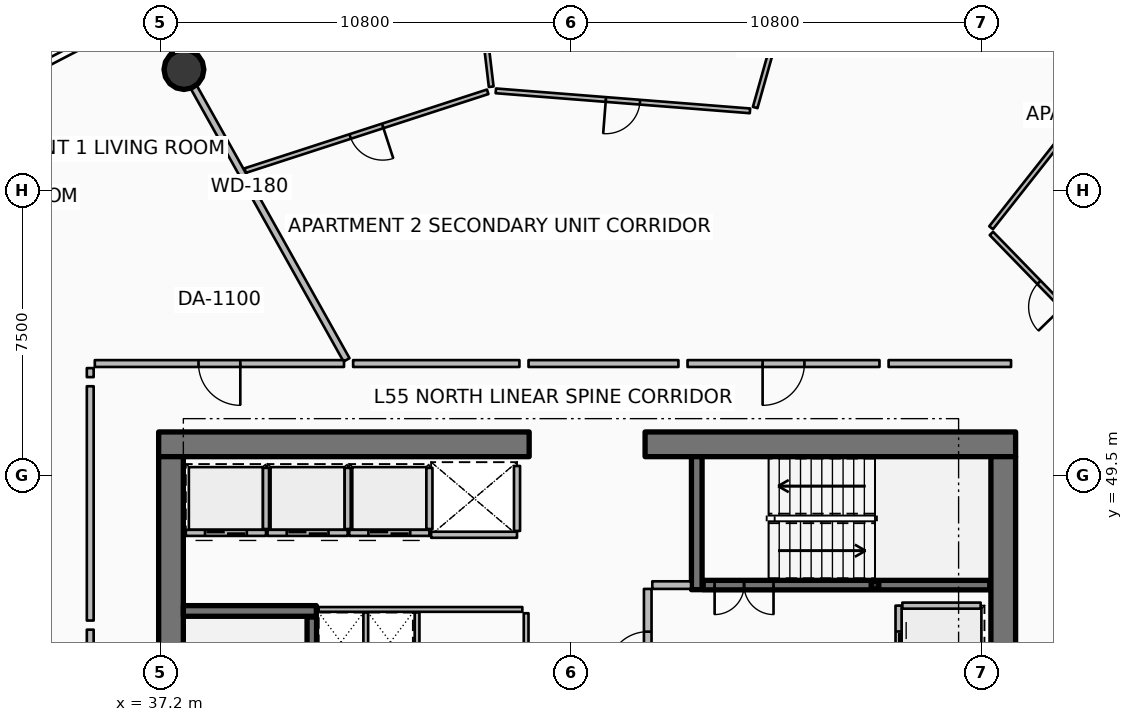
"""IFC4 building model, lengths in metres.
Left out: names, types, materials, properties, quantities, classifications, styles, units other than length and angle.
Written with IfcOpenShell. Run it as: python <this file> out.ifc"""

import sys

from ifc_helpers import new_model, si_unit, direction, frame, frame_2d, origin, origin_2d, place, context, subcontext, project, spatial, rectangle, hollow_rectangle, circle, extrude, element, fill, save


model = new_model("IFC4")
c1 = context("Model", 3, precision=1e-05, world=origin(), true_north=direction((0.0, 1.0)))
c2 = subcontext(c1, "Body", "Model", "MODEL_VIEW")
j1 = project(units=[si_unit("LENGTHUNIT", "METRE"), si_unit("PLANEANGLEUNIT", "RADIAN")], contexts=[c1])
p1 = place(None, origin())
s1 = spatial("IfcSite", under=j1, at=p1, CompositionType="ELEMENT")
p2 = place(p1, origin())
s2 = spatial("IfcBuilding", under=s1, at=p2, CompositionType="ELEMENT")
p3 = place(p2, frame((0.0, 0.0, 217.8)))
s3 = spatial("IfcBuildingStorey", under=s2, at=p3, CompositionType="ELEMENT", Elevation=217.8)
for number, where, z_axis, x_axis in (
    (1, (37.15, 50.325, 0.0), (0.0, 0.0, 1.0), (1.0, 0.0, 0.0)),
    (2, (49.95, 50.325, 0.0), (0.0, 0.0, 1.0), (1.0, 0.0, 0.0)),
):
    element("IfcWall", number, at=place(p3, frame(where, z_axis=z_axis, x_axis=x_axis)), inside=s3, PredefinedType="SHEAR", context=c2, shape_type="SweptSolid", body=[
        extrude(rectangle(XDim=9.75, YDim=0.65, at=frame_2d((4.875, 0.0))), origin(), (0.0, 0.0, 1.0), 3.75),
    ])
for number, where, z_axis, x_axis in (
    (3, (37.475, 34.0, 0.0), (0.0, 0.0, 1.0), (0.0, 1.0, 0.0)),
    (4, (59.375, 34.0, 0.0), (0.0, 0.0, 1.0), (0.0, 1.0, 0.0)),
):
    element("IfcWall", number, at=place(p3, frame(where, z_axis=z_axis, x_axis=x_axis)), inside=s3, PredefinedType="SHEAR", context=c2, shape_type="SweptSolid", body=[
        extrude(rectangle(XDim=16.0, YDim=0.65, at=frame_2d((8.0, 0.0))), origin(), (0.0, 0.0, 1.0), 3.75),
    ])
for number, where, z_axis, x_axis in (
    (5, (37.8, 45.94, 0.0), (0.0, 0.0, 1.0), (1.0, 0.0, 0.0)),
    (6, (51.31, 46.5, 0.0), (0.0, 0.0, 1.0), (0.0, 1.0, 0.0)),
):
    element("IfcWall", number, at=place(p3, frame(where, z_axis=z_axis, x_axis=x_axis)), inside=s3, PredefinedType="SHEAR", context=c2, shape_type="SweptSolid", body=[
        extrude(rectangle(XDim=3.5, YDim=0.28, at=frame_2d((1.75, 0.0))), origin(), (0.0, 0.0, 1.0), 3.75),
    ])
p4 = place(p3, frame((56.0, 46.62, 0.0), z_axis=(0.0, 0.0, 1.0), x_axis=(1.0, 0.0, 0.0)))
e7 = element("IfcColumn", 7, at=p4, inside=s3, PredefinedType="COLUMN", context=c2, shape_type="SweptSolid", body=[
    extrude(hollow_rectangle(XDim=0.2, YDim=0.2, WallThickness=0.01, InnerFilletRadius=0.01, OuterFilletRadius=0.02, at=origin_2d()), origin(), (0.0, 0.0, 1.0), 1.67),
])
p5 = place(p3, frame((37.815, 60.186, 0.0), z_axis=(0.0, 0.0, 1.0), x_axis=(1.0, 0.0, 0.0)))
e8 = element("IfcColumn", 8, at=p5, inside=s3, PredefinedType="COLUMN", context=c2, shape_type="SweptSolid", body=[
    extrude(circle(Radius=0.525, at=origin_2d()), origin(), (0.0, 0.0, 1.0), 3.5),
])
p6 = place(p3, frame((41.18, 38.22, 0.0), z_axis=(0.0, 0.0, 1.0), x_axis=(0.0, 1.0, 0.0)))
e9 = element("IfcWall", 9, at=p6, inside=s3, PredefinedType="SOLIDWALL", context=c2, shape_type="SweptSolid", body=[
    extrude(rectangle(XDim=7.56, YDim=0.25, at=frame_2d((3.78, 0.0))), origin(), (0.0, 0.0, 1.0), 3.5),
])
p7 = place(p6, frame((0.3, 0.0, 0.0)))
e10 = element("IfcOpeningElement", 10, at=p7, cuts=e9, PredefinedType="OPENING", context=c2, shape_type="SweptSolid", body=[
    extrude(rectangle(XDim=1.55, YDim=2.15, at=frame_2d((0.775, 1.075))), frame((0.0, 0.135, 0.0), z_axis=(0.0, -1.0, 0.0), x_axis=(1.0, 0.0, 0.0)), (0.0, 0.0, 1.0), 0.27),
])
p8 = place(p3, frame((51.48, 46.62, 0.0), z_axis=(0.0, 0.0, 1.0), x_axis=(1.0, 0.0, 0.0)))
e11 = element("IfcWall", 11, at=p8, inside=s3, PredefinedType="SOLIDWALL", context=c2, shape_type="SweptSolid", body=[
    extrude(rectangle(XDim=7.54, YDim=0.25, at=frame_2d((3.77, 0.0))), origin(), (0.0, 0.0, 1.0), 3.5),
])
p9 = place(p8, frame((0.3, 0.0, 0.0)))
e12 = element("IfcOpeningElement", 12, at=p9, cuts=e11, PredefinedType="OPENING", context=c2, shape_type="SweptSolid", body=[
    extrude(rectangle(XDim=1.55, YDim=2.15, at=frame_2d((0.775, 1.075))), frame((0.0, 0.135, 0.0), z_axis=(0.0, -1.0, 0.0), x_axis=(1.0, 0.0, 0.0)), (0.0, 0.0, 1.0), 0.27),
])
p10 = place(p3, frame((39.975, 47.995, 0.0), z_axis=(0.0, 0.0, 1.0), x_axis=(-1.0, 0.0, 0.0)))
e13 = element("IfcWall", 13, at=p10, inside=s3, PredefinedType="PARTITIONING", context=c2, shape_type="SweptSolid", body=[
    extrude(rectangle(XDim=2.11, YDim=0.16, at=frame_2d((1.055, 0.0))), origin(), (0.0, 0.0, 1.0), 3.5),
])
p11 = place(p10, frame((0.505, 0.0, 0.0)))
e14 = element("IfcOpeningElement", 14, at=p11, cuts=e13, PredefinedType="OPENING", context=c2, shape_type="SweptSolid", body=[
    extrude(rectangle(XDim=1.1, YDim=2.1, at=frame_2d((0.55, 1.05))), frame((0.0, 0.09, 0.0), z_axis=(0.0, -1.0, 0.0), x_axis=(1.0, 0.0, 0.0)), (0.0, 0.0, 1.0), 0.18),
])
p12 = place(p3, frame((39.975, 48.095, 0.0), z_axis=(0.0, 0.0, 1.0), x_axis=(0.0, 1.0, 0.0)))
e15 = element("IfcWall", 15, at=p12, inside=s3, PredefinedType="PARTITIONING", context=c2, shape_type="SweptSolid", body=[
    extrude(rectangle(XDim=1.61, YDim=0.16, at=frame_2d((0.805, 0.0))), origin(), (0.0, 0.0, 1.0), 3.5),
])
p13 = place(p3, frame((42.125, 47.995, 0.0), z_axis=(0.0, 0.0, 1.0), x_axis=(-1.0, 0.0, 0.0)))
e16 = element("IfcWall", 16, at=p13, inside=s3, PredefinedType="PARTITIONING", context=c2, shape_type="SweptSolid", body=[
    extrude(rectangle(XDim=2.11, YDim=0.16, at=frame_2d((1.055, 0.0))), origin(), (0.0, 0.0, 1.0), 3.5),
])
p14 = place(p13, frame((0.505, 0.0, 0.0)))
e17 = element("IfcOpeningElement", 17, at=p14, cuts=e16, PredefinedType="OPENING", context=c2, shape_type="SweptSolid", body=[
    extrude(rectangle(XDim=1.1, YDim=2.1, at=frame_2d((0.55, 1.05))), frame((0.0, 0.09, 0.0), z_axis=(0.0, -1.0, 0.0), x_axis=(1.0, 0.0, 0.0)), (0.0, 0.0, 1.0), 0.18),
])
p15 = place(p3, frame((42.125, 48.095, 0.0), z_axis=(0.0, 0.0, 1.0), x_axis=(0.0, 1.0, 0.0)))
e18 = element("IfcWall", 18, at=p15, inside=s3, PredefinedType="PARTITIONING", context=c2, shape_type="SweptSolid", body=[
    extrude(rectangle(XDim=1.61, YDim=0.16, at=frame_2d((0.805, 0.0))), origin(), (0.0, 0.0, 1.0), 3.5),
])
p16 = place(p3, frame((44.275, 47.995, 0.0), z_axis=(0.0, 0.0, 1.0), x_axis=(-1.0, 0.0, 0.0)))
e19 = element("IfcWall", 19, at=p16, inside=s3, PredefinedType="PARTITIONING", context=c2, shape_type="SweptSolid", body=[
    extrude(rectangle(XDim=2.11, YDim=0.16, at=frame_2d((1.055, 0.0))), origin(), (0.0, 0.0, 1.0), 3.5),
])
p17 = place(p16, frame((0.505, 0.0, 0.0)))
e20 = element("IfcOpeningElement", 20, at=p17, cuts=e19, PredefinedType="OPENING", context=c2, shape_type="SweptSolid", body=[
    extrude(rectangle(XDim=1.1, YDim=2.1, at=frame_2d((0.55, 1.05))), frame((0.0, 0.09, 0.0), z_axis=(0.0, -1.0, 0.0), x_axis=(1.0, 0.0, 0.0)), (0.0, 0.0, 1.0), 0.18),
])
p18 = place(p3, frame((44.275, 48.095, 0.0), z_axis=(0.0, 0.0, 1.0), x_axis=(0.0, 1.0, 0.0)))
e21 = element("IfcWall", 21, at=p18, inside=s3, PredefinedType="PARTITIONING", context=c2, shape_type="SweptSolid", body=[
    extrude(rectangle(XDim=1.61, YDim=0.16, at=frame_2d((0.805, 0.0))), origin(), (0.0, 0.0, 1.0), 3.5),
])
p19 = place(p3, frame((46.58, 47.945, 0.0), z_axis=(0.0, 0.0, 1.0), x_axis=(-1.0, 0.0, 0.0)))
e22 = element("IfcWall", 22, at=p19, inside=s3, PredefinedType="PARTITIONING", context=c2, shape_type="SweptSolid", body=[
    extrude(rectangle(XDim=2.26, YDim=0.16, at=frame_2d((1.13, 0.0))), origin(), (0.0, 0.0, 1.0), 3.5),
])
p20 = place(p3, frame((46.58, 48.045, 0.0), z_axis=(0.0, 0.0, 1.0), x_axis=(0.0, 1.0, 0.0)))
e23 = element("IfcWall", 23, at=p20, inside=s3, PredefinedType="PARTITIONING", context=c2, shape_type="SweptSolid", body=[
    extrude(rectangle(XDim=1.71, YDim=0.16, at=frame_2d((0.855, 0.0))), origin(), (0.0, 0.0, 1.0), 3.5),
])
p21 = place(p3, frame((56.62, 46.08, 0.0), z_axis=(0.0, 0.0, 1.0), x_axis=(0.0, -1.0, 0.0)))
e24 = element("IfcWall", 24, at=p21, inside=s3, PredefinedType="PARTITIONING", context=c2, shape_type="SweptSolid", body=[
    extrude(rectangle(XDim=2.46, YDim=0.16, at=frame_2d((1.23, 0.0))), origin(), (0.0, 0.0, 1.0), 3.5),
])
p22 = place(p21, frame((0.68, 0.0, 0.0)))
e25 = element("IfcOpeningElement", 25, at=p22, cuts=e24, PredefinedType="OPENING", context=c2, shape_type="SweptSolid", body=[
    extrude(rectangle(XDim=1.1, YDim=2.1, at=frame_2d((0.55, 1.05))), frame((0.0, 0.09, 0.0), z_axis=(0.0, -1.0, 0.0), x_axis=(1.0, 0.0, 0.0)), (0.0, 0.0, 1.0), 0.18),
])
p23 = place(p3, frame((56.72, 46.08, 0.0), z_axis=(0.0, 0.0, 1.0), x_axis=(1.0, 0.0, 0.0)))
e26 = element("IfcWall", 26, at=p23, inside=s3, PredefinedType="PARTITIONING", context=c2, shape_type="SweptSolid", body=[
    extrude(rectangle(XDim=2.06, YDim=0.16, at=frame_2d((1.03, 0.0))), origin(), (0.0, 0.0, 1.0), 3.5),
])
p24 = place(p3, frame((50.14, 46.62, 0.0), z_axis=(0.0, 0.0, 1.0), x_axis=(1.0, 0.0, 0.0)))
e27 = element("IfcWall", 27, at=p24, inside=s3, PredefinedType="PARTITIONING", context=c2, shape_type="SweptSolid", body=[
    extrude(rectangle(XDim=1.02, YDim=0.2, at=frame_2d((0.51, 0.0))), origin(), (0.0, 0.0, 1.0), 3.5),
])
p25 = place(p3, frame((50.02, 43.22, 0.0), z_axis=(0.0, 0.0, 1.0), x_axis=(0.0, 1.0, 0.0)))
e28 = element("IfcWall", 28, at=p25, inside=s3, PredefinedType="PARTITIONING", context=c2, shape_type="SweptSolid", body=[
    extrude(rectangle(XDim=3.3, YDim=0.2, at=frame_2d((1.65, 0.0))), origin(), (0.0, 0.0, 1.0), 3.5),
])
p26 = place(p25, frame((1.125, 0.0, 0.0)))
e29 = element("IfcOpeningElement", 29, at=p26, cuts=e28, PredefinedType="OPENING", context=c2, shape_type="SweptSolid", body=[
    extrude(rectangle(XDim=1.05, YDim=2.1, at=frame_2d((0.525, 1.05))), frame((0.0, 0.11, 0.0), z_axis=(0.0, -1.0, 0.0), x_axis=(1.0, 0.0, 0.0)), (0.0, 0.0, 1.0), 0.22),
])
p27 = place(p3, frame((41.36, 45.98, 0.0), z_axis=(0.0, 0.0, 1.0), x_axis=(1.0, 0.0, 0.0)))
e30 = element("IfcWall", 30, at=p27, inside=s3, PredefinedType="PARTITIONING", context=c2, shape_type="SweptSolid", body=[
    extrude(rectangle(XDim=5.36, YDim=0.125, at=frame_2d((2.68, 0.0))), origin(), (0.0, 0.0, 1.0), 2.94),
])
p28 = place(p3, frame((42.6, 44.35, 0.0), z_axis=(0.0, 0.0, 1.0), x_axis=(0.0, 1.0, 0.0)))
e31 = element("IfcWall", 31, at=p28, inside=s3, PredefinedType="PARTITIONING", context=c2, shape_type="SweptSolid", body=[
    extrude(rectangle(XDim=1.55, YDim=0.125, at=frame_2d((0.775, 0.0))), origin(), (0.0, 0.0, 1.0), 2.94),
])
p29 = place(p3, frame((43.95, 41.58, 0.0), z_axis=(0.0, 0.0, 1.0), x_axis=(0.0, 1.0, 0.0)))
e32 = element("IfcWall", 32, at=p29, inside=s3, PredefinedType="PARTITIONING", context=c2, shape_type="SweptSolid", body=[
    extrude(rectangle(XDim=4.32, YDim=0.125, at=frame_2d((2.16, 0.0))), origin(), (0.0, 0.0, 1.0), 2.94),
])
p30 = place(p3, frame((46.82, 41.58, 0.0), z_axis=(0.0, 0.0, 1.0), x_axis=(0.0, 1.0, 0.0)))
e33 = element("IfcWall", 33, at=p30, inside=s3, PredefinedType="PARTITIONING", context=c2, shape_type="SweptSolid", body=[
    extrude(rectangle(XDim=4.3, YDim=0.125, at=frame_2d((2.15, 0.0))), origin(), (0.0, 0.0, 1.0), 2.94),
])
p31 = place(p30, frame((1.725, 0.0, 0.0)))
e34 = element("IfcOpeningElement", 34, at=p31, cuts=e33, PredefinedType="OPENING", context=c2, shape_type="SweptSolid", body=[
    extrude(rectangle(XDim=0.85, YDim=2.06, at=frame_2d((0.425, 1.03))), frame((0.0, 0.073, 0.0), z_axis=(0.0, -1.0, 0.0), x_axis=(1.0, 0.0, 0.0)), (0.0, 0.0, 1.0), 0.145),
])
p32 = place(p3, frame((42.094, 52.546, 0.0), z_axis=(0.0, 0.0, 1.0), x_axis=(-0.488614041717, 0.872500039104, 0.0)))
e35 = element("IfcWall", 35, at=p32, inside=s3, PredefinedType="PARTITIONING", context=c2, shape_type="SweptSolid", body=[
    extrude(rectangle(XDim=10.448, YDim=0.18, at=frame_2d((5.224, 0.0))), origin(), (0.0, 0.0, 1.0), 2.94),
])
p33 = place(p3, frame((42.028, 52.45, 0.0), z_axis=(0.0, 0.0, 1.0), x_axis=(-1.0, 0.0, 0.0)))
e36 = element("IfcWall", 36, at=p33, inside=s3, PredefinedType="PARTITIONING", context=c2, shape_type="SweptSolid", body=[
    extrude(rectangle(XDim=6.558, YDim=0.18, at=frame_2d((3.279, 0.0))), origin(), (0.0, 0.0, 1.0), 2.94),
])
p34 = place(p33, frame((2.729, 0.0, 0.0)))
e37 = element("IfcOpeningElement", 37, at=p34, cuts=e36, PredefinedType="OPENING", context=c2, shape_type="SweptSolid", body=[
    extrude(rectangle(XDim=1.1, YDim=2.1, at=frame_2d((0.55, 1.05))), frame((0.0, 0.1, 0.0), z_axis=(0.0, -1.0, 0.0), x_axis=(1.0, 0.0, 0.0)), (0.0, 0.0, 1.0), 0.2),
])
p35 = place(p3, frame((35.35, 52.33, 0.0), z_axis=(0.0, 0.0, 1.0), x_axis=(0.0, -1.0, 0.0)))
e38 = element("IfcWall", 38, at=p35, inside=s3, PredefinedType="PARTITIONING", context=c2, shape_type="SweptSolid", body=[
    extrude(rectangle(XDim=0.238, YDim=0.18, at=frame_2d((0.119, 0.0))), origin(), (0.0, 0.0, 1.0), 2.94),
])
p36 = place(p3, frame((35.35, 51.853, 0.0), z_axis=(0.0, 0.0, 1.0), x_axis=(0.0, -1.0, 0.0)))
e39 = element("IfcWall", 39, at=p36, inside=s3, PredefinedType="PARTITIONING", context=c2, shape_type="SweptSolid", body=[
    extrude(rectangle(XDim=6.165, YDim=0.18, at=frame_2d((3.083, 0.0))), origin(), (0.0, 0.0, 1.0), 2.94),
])
p37 = place(p3, frame((35.35, 45.448, 0.0), z_axis=(0.0, 0.0, 1.0), x_axis=(0.0, -1.0, 0.0)))
e40 = element("IfcWall", 40, at=p37, inside=s3, PredefinedType="PARTITIONING", context=c2, shape_type="SweptSolid", body=[
    extrude(rectangle(XDim=4.825, YDim=0.18, at=frame_2d((2.413, 0.0))), origin(), (0.0, 0.0, 1.0), 2.94),
])
p38 = place(p3, frame((56.118, 52.45, 0.0), z_axis=(0.0, 0.0, 1.0), x_axis=(-1.0, 0.0, 0.0)))
e41 = element("IfcWall", 41, at=p38, inside=s3, PredefinedType="PARTITIONING", context=c2, shape_type="SweptSolid", body=[
    extrude(rectangle(XDim=5.051, YDim=0.18, at=frame_2d((2.525, 0.0))), origin(), (0.0, 0.0, 1.0), 2.94),
])
p39 = place(p38, frame((1.975, 0.0, 0.0)))
e42 = element("IfcOpeningElement", 42, at=p39, cuts=e41, PredefinedType="OPENING", context=c2, shape_type="SweptSolid", body=[
    extrude(rectangle(XDim=1.1, YDim=2.1, at=frame_2d((0.55, 1.05))), frame((0.0, 0.1, 0.0), z_axis=(0.0, -1.0, 0.0), x_axis=(1.0, 0.0, 0.0)), (0.0, 0.0, 1.0), 0.2),
])
p40 = place(p3, frame((59.58, 52.45, 0.0), z_axis=(0.0, 0.0, 1.0), x_axis=(-1.0, 0.0, 0.0)))
e43 = element("IfcWall", 43, at=p40, inside=s3, PredefinedType="PARTITIONING", context=c2, shape_type="SweptSolid", body=[
    extrude(rectangle(XDim=3.222, YDim=0.18, at=frame_2d((1.611, 0.0))), origin(), (0.0, 0.0, 1.0), 2.94),
])
p41 = place(p3, frame((59.055, 56.023, 0.0), z_axis=(0.0, 0.0, 1.0), x_axis=(0.619089281125, 0.785320610958, 0.0)))
e44 = element("IfcWall", 44, at=p41, inside=s3, PredefinedType="PARTITIONING", context=c2, shape_type="SweptSolid", body=[
    extrude(rectangle(XDim=9.273, YDim=0.125, at=frame_2d((4.637, 0.0))), origin(), (0.0, 0.0, 1.0), 2.94),
])
p42 = place(p3, frame((62.194, 52.652, 0.0), z_axis=(0.0, 0.0, 1.0), x_axis=(-0.697036484993, 0.717035660611, 0.0)))
e45 = element("IfcWall", 45, at=p42, inside=s3, PredefinedType="PARTITIONING", context=c2, shape_type="SweptSolid", body=[
    extrude(rectangle(XDim=4.492, YDim=0.125, at=frame_2d((2.246, 0.0))), origin(), (0.0, 0.0, 1.0), 2.94),
])
p43 = place(p42, frame((1.796, 0.0, 0.0)))
e46 = element("IfcOpeningElement", 46, at=p43, cuts=e45, PredefinedType="OPENING", context=c2, shape_type="SweptSolid", body=[
    extrude(rectangle(XDim=0.9, YDim=2.08, at=frame_2d((0.45, 1.04))), frame((0.0, 0.073, 0.0), z_axis=(0.0, -1.0, 0.0), x_axis=(1.0, 0.0, 0.0)), (0.0, 0.0, 1.0), 0.145),
])
p44 = place(p3, frame((50.827, 52.45, 0.0), z_axis=(0.0, 0.0, 1.0), x_axis=(-1.0, 0.0, 0.0)))
e47 = element("IfcWall", 47, at=p44, inside=s3, PredefinedType="PARTITIONING", context=c2, shape_type="SweptSolid", body=[
    extrude(rectangle(XDim=3.944, YDim=0.18, at=frame_2d((1.972, 0.0))), origin(), (0.0, 0.0, 1.0), 2.94),
])
p45 = place(p3, frame((52.847, 59.187, 0.0), z_axis=(0.0, 0.0, 1.0), x_axis=(0.271433998897, 0.962457055791, 0.0)))
e48 = element("IfcWall", 48, at=p45, inside=s3, PredefinedType="PARTITIONING", context=c2, shape_type="SweptSolid", body=[
    extrude(rectangle(XDim=6.87, YDim=0.125, at=frame_2d((3.435, 0.0))), origin(), (0.0, 0.0, 1.0), 2.94),
])
p46 = place(p3, frame((52.71, 59.099, 0.0), z_axis=(0.0, 0.0, 1.0), x_axis=(-0.996916756268, 0.078466432773, 0.0)))
e49 = element("IfcWall", 49, at=p46, inside=s3, PredefinedType="PARTITIONING", context=c2, shape_type="SweptSolid", body=[
    extrude(rectangle(XDim=6.708, YDim=0.125, at=frame_2d((3.354, 0.0))), origin(), (0.0, 0.0, 1.0), 2.94),
])
p47 = place(p46, frame((2.904, 0.0, 0.0)))
e50 = element("IfcOpeningElement", 50, at=p47, cuts=e49, PredefinedType="OPENING", context=c2, shape_type="SweptSolid", body=[
    extrude(rectangle(XDim=0.9, YDim=2.08, at=frame_2d((0.45, 1.04))), frame((0.0, 0.073, 0.0), z_axis=(0.0, -1.0, 0.0), x_axis=(1.0, 0.0, 0.0)), (0.0, 0.0, 1.0), 0.145),
])
p48 = place(p3, frame((46.643, 52.45, 0.0), z_axis=(0.0, 0.0, 1.0), x_axis=(-1.0, 0.0, 0.0)))
e51 = element("IfcWall", 51, at=p48, inside=s3, PredefinedType="PARTITIONING", context=c2, shape_type="SweptSolid", body=[
    extrude(rectangle(XDim=4.376, YDim=0.18, at=frame_2d((2.188, 0.0))), origin(), (0.0, 0.0, 1.0), 2.94),
])
p49 = place(p3, frame((45.901, 59.733, 0.0), z_axis=(0.0, 0.0, 1.0), x_axis=(-0.117511168915, 0.993071560956, 0.0)))
e52 = element("IfcWall", 52, at=p49, inside=s3, PredefinedType="PARTITIONING", context=c2, shape_type="SweptSolid", body=[
    extrude(rectangle(XDim=4.779, YDim=0.125, at=frame_2d((2.389, 0.0))), origin(), (0.0, 0.0, 1.0), 2.94),
])
p50 = place(p3, frame((45.808, 59.6, 0.0), z_axis=(0.0, 0.0, 1.0), x_axis=(-0.951057868445, -0.309012832854, 0.0)))
e53 = element("IfcWall", 53, at=p50, inside=s3, PredefinedType="PARTITIONING", context=c2, shape_type="SweptSolid", body=[
    extrude(rectangle(XDim=6.708, YDim=0.125, at=frame_2d((3.354, 0.0))), origin(), (0.0, 0.0, 1.0), 2.94),
])
p51 = place(p50, frame((2.904, 0.0, 0.0)))
e54 = element("IfcOpeningElement", 54, at=p51, cuts=e53, PredefinedType="OPENING", context=c2, shape_type="SweptSolid", body=[
    extrude(rectangle(XDim=0.9, YDim=2.08, at=frame_2d((0.45, 1.04))), frame((0.0, 0.073, 0.0), z_axis=(0.0, -1.0, 0.0), x_axis=(1.0, 0.0, 0.0)), (0.0, 0.0, 1.0), 0.145),
])
p52 = place(p9, origin())
e55 = element("IfcDoor", 55, at=p52, inside=s3, OperationType="DOUBLE_DOOR_SINGLE_SWING", PredefinedType="DOOR", context=c2, shape_type="SweptSolid", body=[
    extrude(rectangle(XDim=1.55, YDim=2.15, at=frame_2d((0.775, 1.075))), frame((0.0, 0.025, 0.0), z_axis=(0.0, -1.0, 0.0), x_axis=(1.0, 0.0, 0.0)), (0.0, 0.0, 1.0), 0.05),
])
fill(e12, e55)
p53 = place(p11, origin())
e56 = element("IfcDoor", 56, at=p53, inside=s3, OperationType="DOUBLE_DOOR_SLIDING", PredefinedType="DOOR", context=c2, shape_type="SweptSolid", body=[
    extrude(rectangle(XDim=1.1, YDim=2.1, at=frame_2d((0.55, 1.05))), frame((0.0, 0.025, 0.0), z_axis=(0.0, -1.0, 0.0), x_axis=(1.0, 0.0, 0.0)), (0.0, 0.0, 1.0), 0.05),
])
fill(e14, e56)
p54 = place(p14, origin())
e57 = element("IfcDoor", 57, at=p54, inside=s3, OperationType="DOUBLE_DOOR_SLIDING", PredefinedType="DOOR", context=c2, shape_type="SweptSolid", body=[
    extrude(rectangle(XDim=1.1, YDim=2.1, at=frame_2d((0.55, 1.05))), frame((0.0, 0.025, 0.0), z_axis=(0.0, -1.0, 0.0), x_axis=(1.0, 0.0, 0.0)), (0.0, 0.0, 1.0), 0.05),
])
fill(e17, e57)
p55 = place(p17, origin())
e58 = element("IfcDoor", 58, at=p55, inside=s3, OperationType="DOUBLE_DOOR_SLIDING", PredefinedType="DOOR", context=c2, shape_type="SweptSolid", body=[
    extrude(rectangle(XDim=1.1, YDim=2.1, at=frame_2d((0.55, 1.05))), frame((0.0, 0.025, 0.0), z_axis=(0.0, -1.0, 0.0), x_axis=(1.0, 0.0, 0.0)), (0.0, 0.0, 1.0), 0.05),
])
fill(e20, e58)
p56 = place(p22, origin())
e59 = element("IfcDoor", 59, at=p56, inside=s3, OperationType="DOUBLE_DOOR_SLIDING", PredefinedType="DOOR", context=c2, shape_type="SweptSolid", body=[
    extrude(rectangle(XDim=1.1, YDim=2.1, at=frame_2d((0.55, 1.05))), frame((0.0, 0.025, 0.0), z_axis=(0.0, -1.0, 0.0), x_axis=(1.0, 0.0, 0.0)), (0.0, 0.0, 1.0), 0.05),
])
fill(e25, e59)
p57 = place(p26, origin())
e60 = element("IfcDoor", 60, at=p57, inside=s3, OperationType="SINGLE_SWING_LEFT", PredefinedType="DOOR", context=c2, shape_type="SweptSolid", body=[
    extrude(rectangle(XDim=1.05, YDim=2.1, at=frame_2d((0.525, 1.05))), frame((0.0, 0.025, 0.0), z_axis=(0.0, -1.0, 0.0), x_axis=(1.0, 0.0, 0.0)), (0.0, 0.0, 1.0), 0.05),
])
fill(e29, e60)
p58 = place(p34, origin())
e61 = element("IfcDoor", 61, at=p58, inside=s3, OperationType="SINGLE_SWING_LEFT", PredefinedType="DOOR", context=c2, shape_type="SweptSolid", body=[
    extrude(rectangle(XDim=1.1, YDim=2.1, at=frame_2d((0.55, 1.05))), frame((0.0, 0.025, 0.0), z_axis=(0.0, -1.0, 0.0), x_axis=(1.0, 0.0, 0.0)), (0.0, 0.0, 1.0), 0.05),
])
fill(e37, e61)
p59 = place(p39, origin())
e62 = element("IfcDoor", 62, at=p59, inside=s3, OperationType="SINGLE_SWING_RIGHT", PredefinedType="DOOR", context=c2, shape_type="SweptSolid", body=[
    extrude(rectangle(XDim=1.1, YDim=2.1, at=frame_2d((0.55, 1.05))), frame((0.0, 0.025, 0.0), z_axis=(0.0, -1.0, 0.0), x_axis=(1.0, 0.0, 0.0)), (0.0, 0.0, 1.0), 0.05),
])
fill(e42, e62)
p60 = place(p43, origin())
e63 = element("IfcDoor", 63, at=p60, inside=s3, OperationType="SINGLE_SWING_LEFT", PredefinedType="DOOR", context=c2, shape_type="SweptSolid", body=[
    extrude(rectangle(XDim=0.9, YDim=2.08, at=frame_2d((0.45, 1.04))), frame((0.0, 0.025, 0.0), z_axis=(0.0, -1.0, 0.0), x_axis=(1.0, 0.0, 0.0)), (0.0, 0.0, 1.0), 0.05),
])
fill(e46, e63)
p61 = place(p47, origin())
e64 = element("IfcDoor", 64, at=p61, inside=s3, OperationType="SINGLE_SWING_RIGHT", PredefinedType="DOOR", context=c2, shape_type="SweptSolid", body=[
    extrude(rectangle(XDim=0.9, YDim=2.08, at=frame_2d((0.45, 1.04))), frame((0.0, 0.025, 0.0), z_axis=(0.0, -1.0, 0.0), x_axis=(1.0, 0.0, 0.0)), (0.0, 0.0, 1.0), 0.05),
])
fill(e50, e64)
p62 = place(p51, origin())
e65 = element("IfcDoor", 65, at=p62, inside=s3, OperationType="SINGLE_SWING_LEFT", PredefinedType="DOOR", context=c2, shape_type="SweptSolid", body=[
    extrude(rectangle(XDim=0.9, YDim=2.08, at=frame_2d((0.45, 1.04))), frame((0.0, 0.025, 0.0), z_axis=(0.0, -1.0, 0.0), x_axis=(1.0, 0.0, 0.0)), (0.0, 0.0, 1.0), 0.05),
])
fill(e54, e65)
save(model, sys.argv[1])
